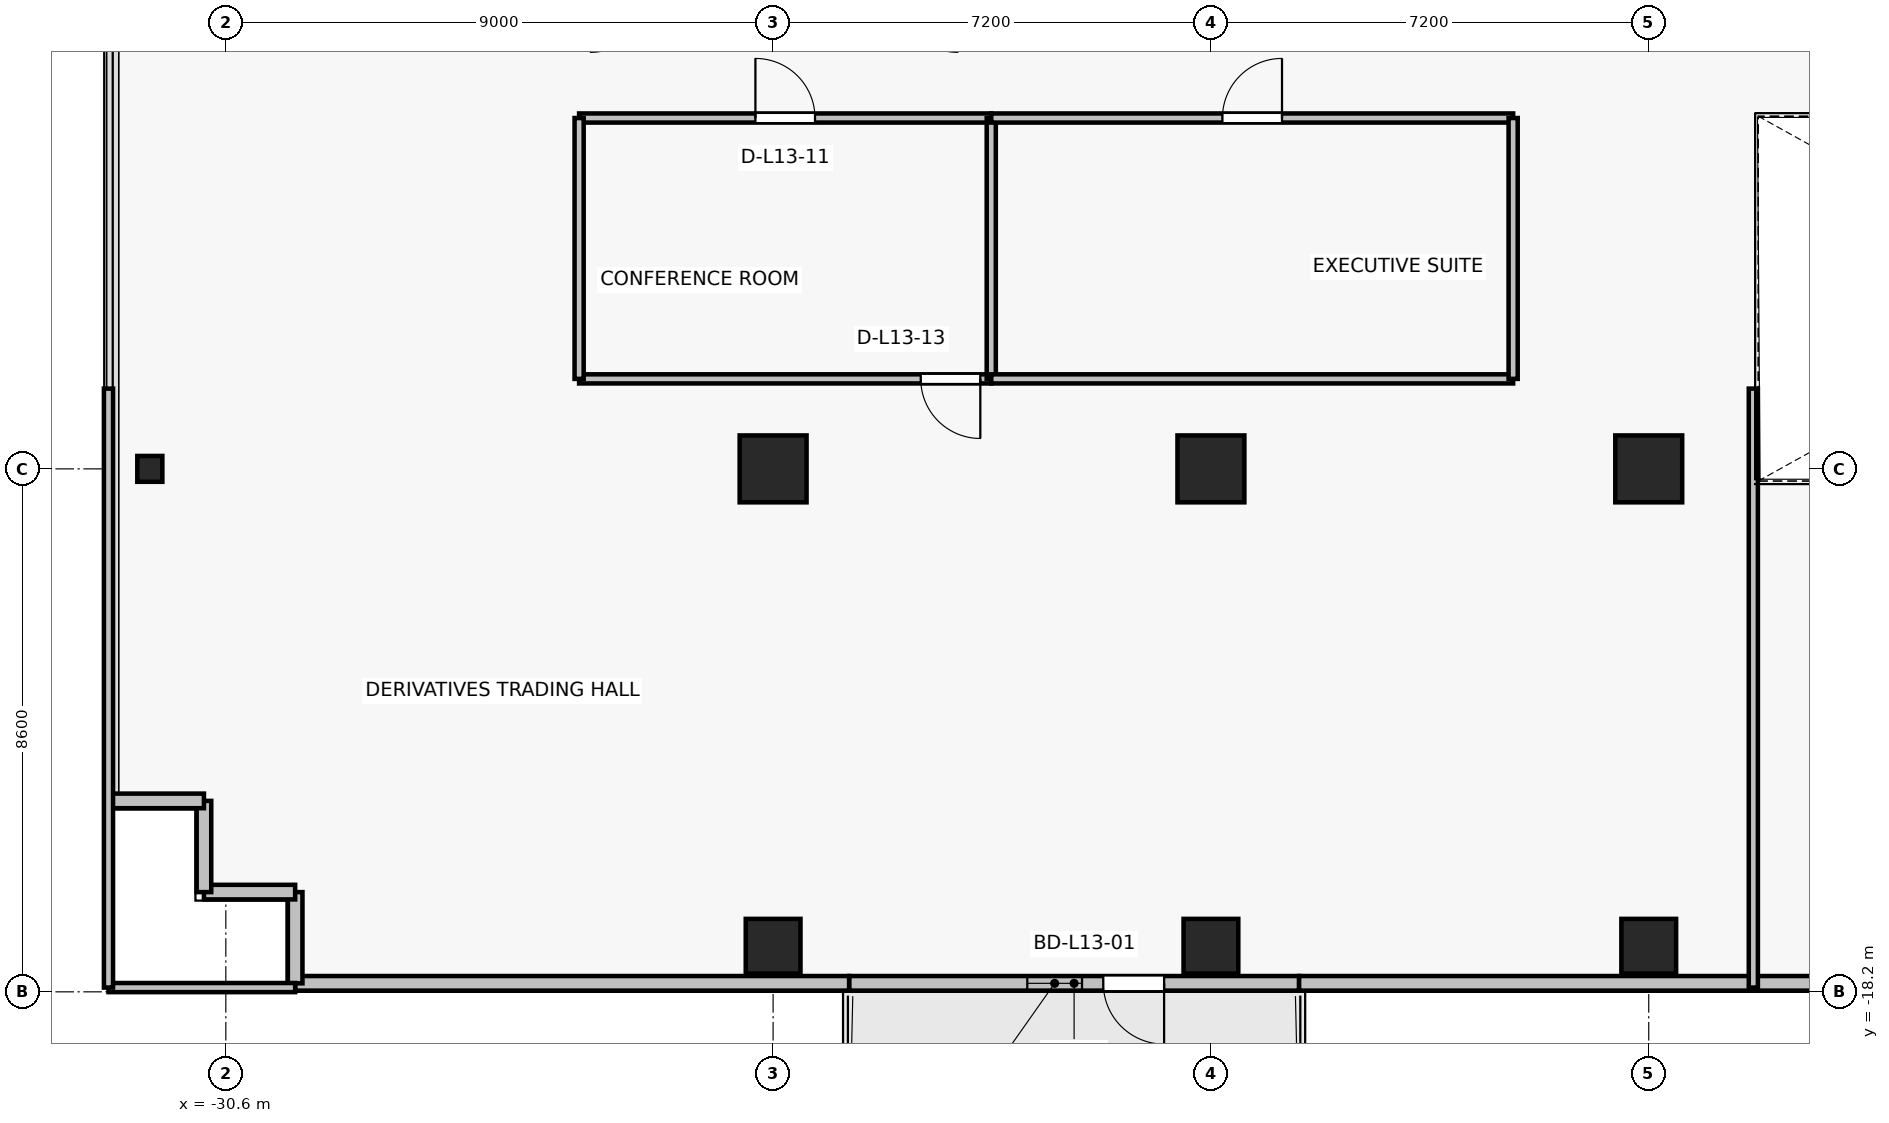
"""IFC4 building model, lengths in metres.
Left out: names, types, materials, properties, quantities, classifications, styles, units other than length and angle.
Written with IfcOpenShell. Run it as: python <this file> out.ifc"""

import sys

from ifc_helpers import new_model, si_unit, direction, frame, frame_2d, origin, origin_2d, place, context, subcontext, project, spatial, rectangle, i_section, extrude, source, transform, mapped, element, fill, save


model = new_model("IFC4")
c1 = context("Model", 3, precision=1e-05, world=origin(), true_north=direction((0.0, 1.0)))
c2 = subcontext(c1, "Body", "Model", "MODEL_VIEW")
j1 = project(units=[si_unit("LENGTHUNIT", "METRE"), si_unit("PLANEANGLEUNIT", "RADIAN")], contexts=[c1])
p1 = place(None, origin())
s1 = spatial("IfcSite", under=j1, at=p1, CompositionType="ELEMENT")
p2 = place(p1, origin())
s2 = spatial("IfcBuilding", under=s1, at=p2, CompositionType="ELEMENT")
p3 = place(p2, frame((0.0, 0.0, 50.5)))
s3 = spatial("IfcBuildingStorey", under=s2, at=p3, CompositionType="ELEMENT", Elevation=50.5)
for number, where, z_axis, x_axis in (
    (1, (-14.4, -9.6, 0.0), (0.0, 0.0, 1.0), (1.0, 0.0, 0.0)),
    (2, (-7.2, -9.6, 0.0), (0.0, 0.0, 1.0), (1.0, 0.0, 0.0)),
    (3, (-21.6, -9.6, 0.0), (0.0, 0.0, 1.0), (1.0, 0.0, 0.0)),
):
    element("IfcColumn", number, at=place(p3, frame(where, z_axis=z_axis, x_axis=x_axis)), inside=s3, PredefinedType="COLUMN", context=c2, shape_type="SweptSolid", body=[
        extrude(rectangle(XDim=1.1, YDim=1.1, at=origin_2d()), origin(), (0.0, 0.0, 1.0), 3.3),
    ])
for number, where, z_axis, x_axis in (
    (4, (-14.4, -17.45, 0.0), (0.0, 0.0, 1.0), (1.0, 0.0, 0.0)),
    (5, (-7.2, -17.45, 0.0), (0.0, 0.0, 1.0), (1.0, 0.0, 0.0)),
    (6, (-21.6, -17.45, 0.0), (0.0, 0.0, 1.0), (1.0, 0.0, 0.0)),
):
    element("IfcColumn", number, at=place(p3, frame(where, z_axis=z_axis, x_axis=x_axis)), inside=s3, PredefinedType="COLUMN", context=c2, shape_type="SweptSolid", body=[
        extrude(rectangle(XDim=0.9, YDim=0.9, at=origin_2d()), origin(), (0.0, 0.0, 1.0), 3.3),
    ])
p4 = place(p3, frame((-31.85, -9.6, 0.0), z_axis=(0.0, 0.0, 1.0), x_axis=(1.0, 0.0, 0.0)))
e7 = element("IfcColumn", 7, at=p4, inside=s3, PredefinedType="COLUMN", context=c2, shape_type="SweptSolid", body=[
    extrude(i_section(OverallWidth=0.412, OverallDepth=0.425, WebThickness=0.026, FlangeThickness=0.039, FilletRadius=0.015, at=origin_2d()), origin(), (0.0, 0.0, 1.0), 3.3),
])
p5 = place(p3, frame((-12.95, -18.06, 0.0), z_axis=(0.0, 0.0, 1.0), x_axis=(-1.0, 0.0, 0.0)))
e8 = element("IfcWall", 8, at=p5, inside=s3, PredefinedType="SOLIDWALL", context=c2, shape_type="SweptSolid", body=[
    extrude(rectangle(XDim=7.4, YDim=0.24, at=frame_2d((3.7, 0.0))), origin(), (0.0, 0.0, 1.0), 2.665),
])
p6 = place(p5, frame((2.22, 0.0, 0.0)))
e9 = element("IfcOpeningElement", 9, at=p6, cuts=e8, PredefinedType="OPENING", context=c2, shape_type="SweptSolid", body=[
    extrude(rectangle(XDim=1.0, YDim=2.2, at=frame_2d((0.5, 1.1))), frame((0.0, 0.13, 0.0), z_axis=(0.0, -1.0, 0.0), x_axis=(1.0, 0.0, 0.0)), (0.0, 0.0, 1.0), 0.26),
])
p7 = place(p5, frame((3.57, 0.0, 0.85)))
e10 = element("IfcOpeningElement", 10, at=p7, cuts=e8, PredefinedType="OPENING", context=c2, shape_type="SweptSolid", body=[
    extrude(rectangle(XDim=0.9, YDim=1.35, at=frame_2d((0.45, 0.675))), frame((0.0, 0.13, 0.0), z_axis=(0.0, -1.0, 0.0), x_axis=(1.0, 0.0, 0.0)), (0.0, 0.0, 1.0), 0.26),
])
p8 = place(p3, frame((-12.95, -18.06, 0.0), z_axis=(0.0, 0.0, 1.0), x_axis=(1.0, 0.0, 0.0)))
e11 = element("IfcWall", 11, at=p8, inside=s3, PredefinedType="SOLIDWALL", context=c2, shape_type="SweptSolid", body=[
    extrude(rectangle(XDim=9.61, YDim=0.24, at=frame_2d((4.805, 0.0))), origin(), (0.0, 0.0, 1.0), 2.665),
])
p9 = place(p3, frame((-29.46, -18.06, 0.0), z_axis=(0.0, 0.0, 1.0), x_axis=(1.0, 0.0, 0.0)))
e12 = element("IfcWall", 12, at=p9, inside=s3, PredefinedType="SOLIDWALL", context=c2, shape_type="SweptSolid", body=[
    extrude(rectangle(XDim=9.11, YDim=0.24, at=frame_2d((4.555, 0.0))), origin(), (0.0, 0.0, 1.0), 3.075),
])
for number, where, z_axis, x_axis in (
    (13, (-29.46, -16.56, 0.0), (0.0, 0.0, 1.0), (0.0, -1.0, 0.0)),
    (14, (-30.96, -16.56, 0.0), (0.0, 0.0, 1.0), (1.0, 0.0, 0.0)),
    (15, (-30.96, -15.06, 0.0), (0.0, 0.0, 1.0), (0.0, -1.0, 0.0)),
    (16, (-32.46, -15.06, 0.0), (0.0, 0.0, 1.0), (1.0, 0.0, 0.0)),
):
    element("IfcWall", number, at=place(p3, frame(where, z_axis=z_axis, x_axis=x_axis)), inside=s3, PredefinedType="SOLIDWALL", context=c2, shape_type="SweptSolid", body=[
        extrude(rectangle(XDim=1.5, YDim=0.24, at=frame_2d((0.75, 0.0))), origin(), (0.0, 0.0, 1.0), 3.075),
    ])
p10 = place(p3, frame((-18.012, -8.12, 0.0), z_axis=(0.0, 0.0, 1.0), x_axis=(-1.0, 0.0, 0.0)))
e17 = element("IfcWall", 17, at=p10, inside=s3, PredefinedType="PARTITIONING", context=c2, shape_type="SweptSolid", body=[
    extrude(rectangle(XDim=6.778, YDim=0.15, at=frame_2d((3.389, 0.0))), origin(), (0.0, 0.0, 1.0), 2.465),
])
p11 = place(p10, frame((0.18, 0.0, 0.0)))
e18 = element("IfcOpeningElement", 18, at=p11, cuts=e17, PredefinedType="OPENING", context=c2, shape_type="SweptSolid", body=[
    extrude(rectangle(XDim=0.98, YDim=2.15, at=frame_2d((0.49, 1.075))), frame((0.0, 0.085, 0.0), z_axis=(0.0, -1.0, 0.0), x_axis=(1.0, 0.0, 0.0)), (0.0, 0.0, 1.0), 0.17),
])
p12 = place(p3, frame((-24.79, -3.83, 0.0), z_axis=(0.0, 0.0, 1.0), x_axis=(1.0, 0.0, 0.0)))
e19 = element("IfcWall", 19, at=p12, inside=s3, PredefinedType="PARTITIONING", context=c2, shape_type="SweptSolid", body=[
    extrude(rectangle(XDim=6.778, YDim=0.15, at=frame_2d((3.389, 0.0))), origin(), (0.0, 0.0, 1.0), 2.465),
])
p13 = place(p12, frame((2.899, 0.0, 0.0)))
e20 = element("IfcOpeningElement", 20, at=p13, cuts=e19, PredefinedType="OPENING", context=c2, shape_type="SweptSolid", body=[
    extrude(rectangle(XDim=0.98, YDim=2.15, at=frame_2d((0.49, 1.075))), frame((0.0, 0.085, 0.0), z_axis=(0.0, -1.0, 0.0), x_axis=(1.0, 0.0, 0.0)), (0.0, 0.0, 1.0), 0.17),
])
for number, where, z_axis, x_axis in (
    (21, (-24.79, -8.12, 0.0), (0.0, 0.0, 1.0), (0.0, 1.0, 0.0)),
    (22, (-18.012, -3.83, 0.0), (0.0, 0.0, 1.0), (0.0, -1.0, 0.0)),
):
    element("IfcWall", number, at=place(p3, frame(where, z_axis=z_axis, x_axis=x_axis)), inside=s3, PredefinedType="PARTITIONING", context=c2, shape_type="SweptSolid", body=[
        extrude(rectangle(XDim=4.29, YDim=0.15, at=frame_2d((2.145, 0.0))), origin(), (0.0, 0.0, 1.0), 2.565),
    ])
p14 = place(p3, frame((-9.43, -8.12, 0.0), z_axis=(0.0, 0.0, 1.0), x_axis=(-1.0, 0.0, 0.0)))
e23 = element("IfcWall", 23, at=p14, inside=s3, PredefinedType="PARTITIONING", context=c2, shape_type="SweptSolid", body=[
    extrude(rectangle(XDim=8.583, YDim=0.15, at=frame_2d((4.291, 0.0))), origin(), (0.0, 0.0, 1.0), 2.465),
])
p15 = place(p3, frame((-18.012, -3.83, 0.0), z_axis=(0.0, 0.0, 1.0), x_axis=(1.0, 0.0, 0.0)))
e24 = element("IfcWall", 24, at=p15, inside=s3, PredefinedType="PARTITIONING", context=c2, shape_type="SweptSolid", body=[
    extrude(rectangle(XDim=8.583, YDim=0.15, at=frame_2d((4.291, 0.0))), origin(), (0.0, 0.0, 1.0), 2.465),
])
p16 = place(p15, frame((3.802, 0.0, 0.0)))
e25 = element("IfcOpeningElement", 25, at=p16, cuts=e24, PredefinedType="OPENING", context=c2, shape_type="SweptSolid", body=[
    extrude(rectangle(XDim=0.98, YDim=2.15, at=frame_2d((0.49, 1.075))), frame((0.0, 0.085, 0.0), z_axis=(0.0, -1.0, 0.0), x_axis=(1.0, 0.0, 0.0)), (0.0, 0.0, 1.0), 0.17),
])
p17 = place(p3, frame((-9.43, -3.83, 0.0), z_axis=(0.0, 0.0, 1.0), x_axis=(0.0, -1.0, 0.0)))
e26 = element("IfcWall", 26, at=p17, inside=s3, PredefinedType="PARTITIONING", context=c2, shape_type="SweptSolid", body=[
    extrude(rectangle(XDim=4.29, YDim=0.15, at=frame_2d((2.145, 0.0))), origin(), (0.0, 0.0, 1.0), 2.565),
])
p18 = place(p3, frame((-29.46, -18.13, 0.0), z_axis=(0.0, 0.0, 1.0), x_axis=(-1.0, 0.0, 0.0)))
e27 = element("IfcWall", 27, at=p18, inside=s3, PredefinedType="PARTITIONING", context=c2, shape_type="SweptSolid", body=[
    extrude(rectangle(XDim=3.07, YDim=0.15, at=frame_2d((1.535, 0.0))), origin(), (0.0, 0.0, 1.0), 2.665),
])
p19 = place(p3, frame((-32.53, -18.13, 0.0), z_axis=(0.0, 0.0, 1.0), x_axis=(0.0, 1.0, 0.0)))
e28 = element("IfcWall", 28, at=p19, inside=s3, PredefinedType="PARTITIONING", context=c2, shape_type="SweptSolid", body=[
    extrude(rectangle(XDim=9.85, YDim=0.15, at=frame_2d((4.925, 0.0))), origin(), (0.0, 0.0, 1.0), 3.075),
])
p20 = place(p3, frame((-5.48, -8.28, 0.0), z_axis=(0.0, 0.0, 1.0), x_axis=(0.0, -1.0, 0.0)))
e29 = element("IfcWall", 29, at=p20, inside=s3, PredefinedType="PARTITIONING", context=c2, shape_type="SweptSolid", body=[
    extrude(rectangle(XDim=9.85, YDim=0.15, at=frame_2d((4.925, 0.0))), origin(), (0.0, 0.0, 1.0), 2.465),
])
m1 = source(origin(), c2, "Body", "SweptSolid", [
    extrude(rectangle(XDim=1.0, YDim=2.2, at=frame_2d((0.5, 1.1))), frame((0.0, 0.025, 0.0), z_axis=(0.0, -1.0, 0.0), x_axis=(1.0, 0.0, 0.0)), (0.0, 0.0, 1.0), 0.05),
])
p21 = place(p6, origin())
e30 = element("IfcDoor", 30, at=p21, inside=s3, OperationType="SINGLE_SWING_LEFT", PredefinedType="DOOR", context=c2, shape_type="MappedRepresentation", body=[
    mapped(m1, transform((0.0, 0.0, 0.0), x_axis=(1.0, 0.0, 0.0), y_axis=(0.0, 1.0, 0.0), z_axis=(0.0, 0.0, 1.0), scale=1.0)),
])
fill(e9, e30)
m2 = source(origin(), c2, "Body", "SweptSolid", [
    extrude(rectangle(XDim=0.9, YDim=1.35, at=frame_2d((0.45, 0.675))), frame((0.0, 0.03, 0.0), z_axis=(0.0, -1.0, 0.0), x_axis=(1.0, 0.0, 0.0)), (0.0, 0.0, 1.0), 0.06),
])
p22 = place(p7, origin())
e31 = element("IfcWindow", 31, at=p22, inside=s3, PartitioningType="SINGLE_PANEL", PredefinedType="WINDOW", context=c2, shape_type="MappedRepresentation", body=[
    mapped(m2, transform((0.0, 0.0, 0.0), x_axis=(1.0, 0.0, 0.0), y_axis=(0.0, 1.0, 0.0), z_axis=(0.0, 0.0, 1.0), scale=1.0)),
])
fill(e10, e31)
m3 = source(origin(), c2, "Body", "SweptSolid", [
    extrude(rectangle(XDim=0.98, YDim=2.15, at=frame_2d((0.49, 1.075))), frame((0.0, 0.025, 0.0), z_axis=(0.0, -1.0, 0.0), x_axis=(1.0, 0.0, 0.0)), (0.0, 0.0, 1.0), 0.05),
])
p23 = place(p13, origin())
e32 = element("IfcDoor", 32, at=p23, inside=s3, OperationType="SINGLE_SWING_LEFT", PredefinedType="DOOR", context=c2, shape_type="MappedRepresentation", body=[
    mapped(m3, transform((0.0, 0.0, 0.0), x_axis=(1.0, 0.0, 0.0), y_axis=(0.0, 1.0, 0.0), z_axis=(0.0, 0.0, 1.0), scale=1.0)),
])
fill(e20, e32)
p24 = place(p16, origin())
e33 = element("IfcDoor", 33, at=p24, inside=s3, OperationType="SINGLE_SWING_RIGHT", PredefinedType="DOOR", context=c2, shape_type="MappedRepresentation", body=[
    mapped(m3, transform((0.0, 0.0, 0.0), x_axis=(1.0, 0.0, 0.0), y_axis=(0.0, 1.0, 0.0), z_axis=(0.0, 0.0, 1.0), scale=1.0)),
])
fill(e25, e33)
p25 = place(p11, origin())
e34 = element("IfcDoor", 34, at=p25, inside=s3, OperationType="SINGLE_SWING_LEFT", PredefinedType="DOOR", context=c2, shape_type="MappedRepresentation", body=[
    mapped(m3, transform((0.0, 0.0, 0.0), x_axis=(1.0, 0.0, 0.0), y_axis=(0.0, 1.0, 0.0), z_axis=(0.0, 0.0, 1.0), scale=1.0)),
])
fill(e18, e34)
save(model, sys.argv[1])
